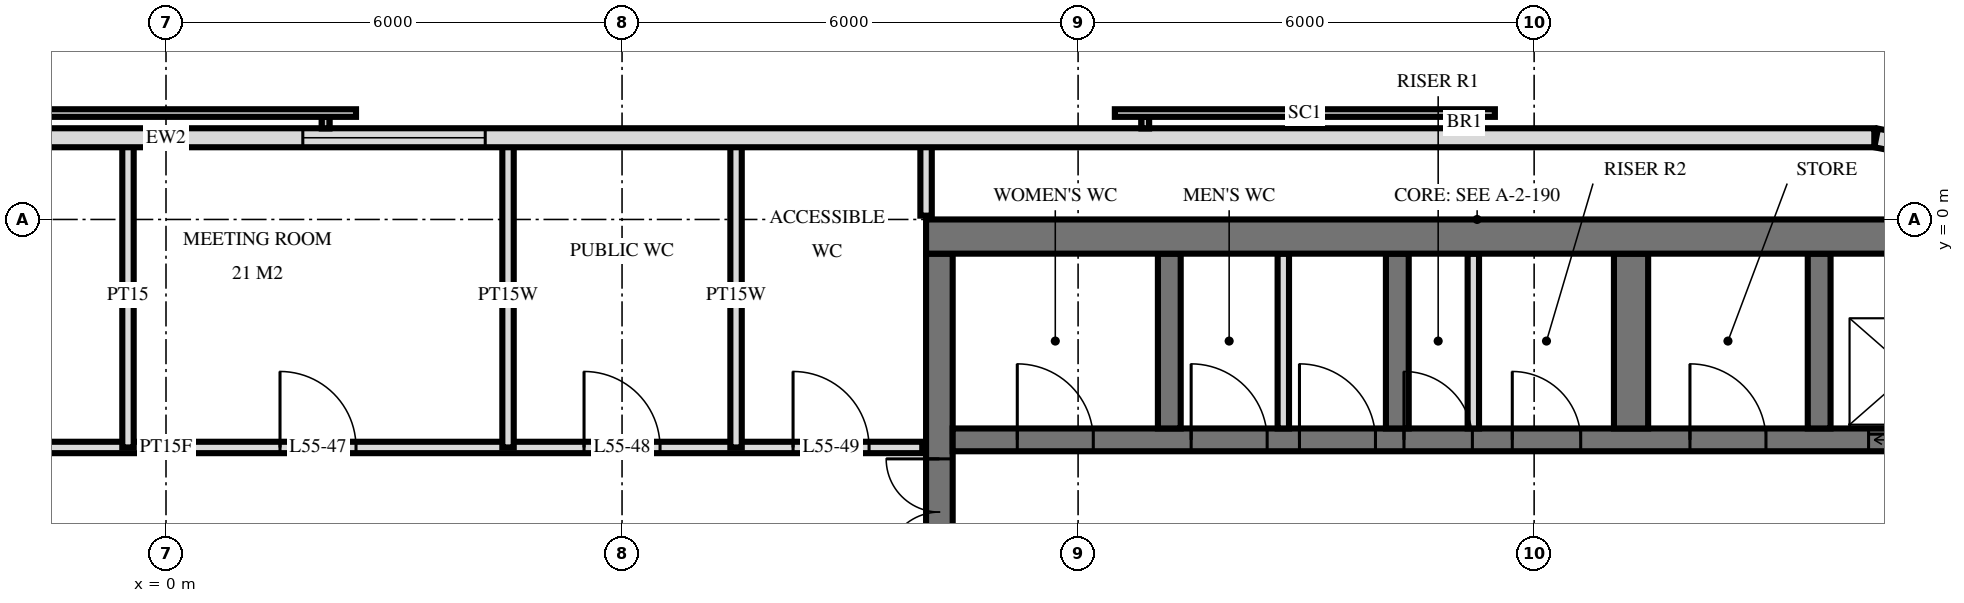
"""IFC4 building model, lengths in metres.
Left out: names, types, materials, properties, quantities, classifications, styles, units other than length and angle.
Written with IfcOpenShell. Run it as: python <this file> out.ifc"""

import sys

from ifc_helpers import new_model, si_unit, direction, frame, frame_2d, origin, place, context, subcontext, project, spatial, rectangle, extrude, element, fill, save


model = new_model("IFC4")
c1 = context("Model", 3, precision=1e-05, world=origin(), true_north=direction((0.0, 1.0)))
c2 = subcontext(c1, "Body", "Model", "MODEL_VIEW")
j1 = project(units=[si_unit("LENGTHUNIT", "METRE"), si_unit("PLANEANGLEUNIT", "RADIAN")], contexts=[c1])
p1 = place(None, origin())
s1 = spatial("IfcSite", under=j1, at=p1, CompositionType="ELEMENT")
p2 = place(p1, origin())
s2 = spatial("IfcBuilding", under=s1, at=p2, CompositionType="ELEMENT")
p3 = place(p2, frame((0.0, 0.0, 211.6)))
s3 = spatial("IfcBuildingStorey", under=s2, at=p3, CompositionType="ELEMENT", Elevation=211.6)
p4 = place(p3, frame((10.0, -0.225, 0.0), z_axis=(0.0, 0.0, 1.0), x_axis=(1.0, 0.0, 0.0)))
e1 = element("IfcWall", 1, at=p4, inside=s3, PredefinedType="SHEAR", context=c2, shape_type="SweptSolid", body=[
    extrude(rectangle(XDim=14.5, YDim=0.45, at=frame_2d((7.25, 0.0))), origin(), (0.0, 0.0, 1.0), 3.5),
])
p5 = place(p3, frame((10.175, -14.55, 0.0), z_axis=(0.0, 0.0, 1.0), x_axis=(0.0, 1.0, 0.0)))
e2 = element("IfcWall", 2, at=p5, inside=s3, PredefinedType="SHEAR", context=c2, shape_type="SweptSolid", body=[
    extrude(rectangle(XDim=14.1, YDim=0.35, at=frame_2d((7.05, 0.0))), origin(), (0.0, 0.0, 1.0), 3.5),
])
p6 = place(p5, frame((8.4, 0.0, 0.0)))
e3 = element("IfcOpeningElement", 3, at=p6, cuts=e2, PredefinedType="OPENING", context=c2, shape_type="SweptSolid", body=[
    extrude(rectangle(XDim=1.4, YDim=2.4, at=frame_2d((0.7, 1.2))), frame((0.0, 0.185, 0.0), z_axis=(0.0, -1.0, 0.0), x_axis=(1.0, 0.0, 0.0)), (0.0, 0.0, 1.0), 0.37),
])
p7 = place(p5, frame((10.0, 0.0, 0.0)))
e4 = element("IfcOpeningElement", 4, at=p7, cuts=e2, PredefinedType="OPENING", context=c2, shape_type="SweptSolid", body=[
    extrude(rectangle(XDim=1.4, YDim=2.4, at=frame_2d((0.7, 1.2))), frame((0.0, 0.185, 0.0), z_axis=(0.0, -1.0, 0.0), x_axis=(1.0, 0.0, 0.0)), (0.0, 0.0, 1.0), 0.37),
])
p8 = place(p5, frame((4.0, 0.0, 0.0)))
e5 = element("IfcOpeningElement", 5, at=p8, cuts=e2, PredefinedType="OPENING", context=c2, shape_type="SweptSolid", body=[
    extrude(rectangle(XDim=1.2, YDim=2.1, at=frame_2d((0.6, 1.05))), frame((0.0, 0.185, 0.0), z_axis=(0.0, -1.0, 0.0), x_axis=(1.0, 0.0, 0.0)), (0.0, 0.0, 1.0), 0.37),
])
p9 = place(p3, frame((10.35, -2.9, 0.0), z_axis=(0.0, 0.0, 1.0), x_axis=(1.0, 0.0, 0.0)))
e6 = element("IfcWall", 6, at=p9, inside=s3, PredefinedType="SHEAR", context=c2, shape_type="SweptSolid", body=[
    extrude(rectangle(XDim=13.7, YDim=0.3, at=frame_2d((6.85, 0.0))), origin(), (0.0, 0.0, 1.0), 3.5),
])
p10 = place(p9, frame((12.05, 0.0, 0.0)))
e7 = element("IfcOpeningElement", 7, at=p10, cuts=e6, PredefinedType="OPENING", context=c2, shape_type="SweptSolid", body=[
    extrude(rectangle(XDim=1.1, YDim=2.1, at=frame_2d((0.55, 1.05))), frame((0.0, 0.16, 0.0), z_axis=(0.0, -1.0, 0.0), x_axis=(1.0, 0.0, 0.0)), (0.0, 0.0, 1.0), 0.32),
])
p11 = place(p9, frame((5.938, 0.0, 0.0)))
e8 = element("IfcOpeningElement", 8, at=p11, cuts=e6, PredefinedType="OPENING", context=c2, shape_type="SweptSolid", body=[
    extrude(rectangle(XDim=0.9, YDim=2.1, at=frame_2d((0.45, 1.05))), frame((0.0, 0.16, 0.0), z_axis=(0.0, -1.0, 0.0), x_axis=(1.0, 0.0, 0.0)), (0.0, 0.0, 1.0), 0.32),
])
p12 = place(p9, frame((7.363, 0.0, 0.0)))
e9 = element("IfcOpeningElement", 9, at=p12, cuts=e6, PredefinedType="OPENING", context=c2, shape_type="SweptSolid", body=[
    extrude(rectangle(XDim=0.9, YDim=2.1, at=frame_2d((0.45, 1.05))), frame((0.0, 0.16, 0.0), z_axis=(0.0, -1.0, 0.0), x_axis=(1.0, 0.0, 0.0)), (0.0, 0.0, 1.0), 0.32),
])
p13 = place(p9, frame((0.85, 0.0, 0.0)))
e10 = element("IfcOpeningElement", 10, at=p13, cuts=e6, PredefinedType="OPENING", context=c2, shape_type="SweptSolid", body=[
    extrude(rectangle(XDim=1.0, YDim=2.1, at=frame_2d((0.5, 1.05))), frame((0.0, 0.16, 0.0), z_axis=(0.0, -1.0, 0.0), x_axis=(1.0, 0.0, 0.0)), (0.0, 0.0, 1.0), 0.32),
])
p14 = place(p9, frame((3.137, 0.0, 0.0)))
e11 = element("IfcOpeningElement", 11, at=p14, cuts=e6, PredefinedType="OPENING", context=c2, shape_type="SweptSolid", body=[
    extrude(rectangle(XDim=1.0, YDim=2.1, at=frame_2d((0.5, 1.05))), frame((0.0, 0.16, 0.0), z_axis=(0.0, -1.0, 0.0), x_axis=(1.0, 0.0, 0.0)), (0.0, 0.0, 1.0), 0.32),
])
p15 = place(p9, frame((4.562, 0.0, 0.0)))
e12 = element("IfcOpeningElement", 12, at=p15, cuts=e6, PredefinedType="OPENING", context=c2, shape_type="SweptSolid", body=[
    extrude(rectangle(XDim=1.0, YDim=2.1, at=frame_2d((0.5, 1.05))), frame((0.0, 0.16, 0.0), z_axis=(0.0, -1.0, 0.0), x_axis=(1.0, 0.0, 0.0)), (0.0, 0.0, 1.0), 0.32),
])
p16 = place(p9, frame((9.7, 0.0, 0.0)))
e13 = element("IfcOpeningElement", 13, at=p16, cuts=e6, PredefinedType="OPENING", context=c2, shape_type="SweptSolid", body=[
    extrude(rectangle(XDim=1.0, YDim=2.1, at=frame_2d((0.5, 1.05))), frame((0.0, 0.16, 0.0), z_axis=(0.0, -1.0, 0.0), x_axis=(1.0, 0.0, 0.0)), (0.0, 0.0, 1.0), 0.32),
])
for number, where, z_axis, x_axis in (
    (14, (13.2, -2.75, 0.0), (0.0, 0.0, 1.0), (0.0, 1.0, 0.0)),
    (15, (16.2, -2.75, 0.0), (0.0, 0.0, 1.0), (0.0, 1.0, 0.0)),
):
    element("IfcWall", number, at=place(p3, frame(where, z_axis=z_axis, x_axis=x_axis)), inside=s3, PredefinedType="SHEAR", context=c2, shape_type="SweptSolid", body=[
        extrude(rectangle(XDim=2.3, YDim=0.3, at=frame_2d((1.15, 0.0))), origin(), (0.0, 0.0, 1.0), 3.5),
    ])
p17 = place(p3, frame((19.275, -2.75, 0.0), z_axis=(0.0, 0.0, 1.0), x_axis=(0.0, 1.0, 0.0)))
e16 = element("IfcWall", 16, at=p17, inside=s3, PredefinedType="SHEAR", context=c2, shape_type="SweptSolid", body=[
    extrude(rectangle(XDim=2.3, YDim=0.45, at=frame_2d((1.15, 0.0))), origin(), (0.0, 0.0, 1.0), 3.5),
])
p18 = place(p3, frame((21.75, -2.75, 0.0), z_axis=(0.0, 0.0, 1.0), x_axis=(0.0, 1.0, 0.0)))
e17 = element("IfcWall", 17, at=p18, inside=s3, PredefinedType="SHEAR", context=c2, shape_type="SweptSolid", body=[
    extrude(rectangle(XDim=2.3, YDim=0.3, at=frame_2d((1.15, 0.0))), origin(), (0.0, 0.0, 1.0), 3.5),
])
p19 = place(p3, frame((24.149, 0.745, 0.0), z_axis=(0.0, 0.0, 1.0), x_axis=(-0.980803419081, 0.194999110559, 0.0)))
e18 = element("IfcWall", 18, at=p19, inside=s3, PredefinedType="SOLIDWALL", context=c2, shape_type="SweptSolid", body=[
    extrude(rectangle(XDim=1.681, YDim=0.25, at=frame_2d((0.841, 0.0))), origin(), (0.0, 0.0, 1.0), 3.22),
])
p20 = place(p3, frame((22.475, 1.075, 0.0), z_axis=(0.0, 0.0, 1.0), x_axis=(-1.0, 0.0, 0.0)))
e19 = element("IfcWall", 19, at=p20, inside=s3, PredefinedType="SOLIDWALL", context=c2, shape_type="SweptSolid", body=[
    extrude(rectangle(XDim=44.951, YDim=0.25, at=frame_2d((22.475, 0.0))), origin(), (0.0, 0.0, 1.0), 3.22),
])
p21 = place(p20, frame((18.275, 0.0, 0.9)))
e20 = element("IfcOpeningElement", 20, at=p21, cuts=e19, PredefinedType="OPENING", context=c2, shape_type="SweptSolid", body=[
    extrude(rectangle(XDim=2.4, YDim=1.5, at=frame_2d((1.2, 0.75))), frame((0.0, 0.135, 0.0), z_axis=(0.0, -1.0, 0.0), x_axis=(1.0, 0.0, 0.0)), (0.0, 0.0, 1.0), 0.27),
])
p22 = place(p20, frame((24.275, 0.0, 0.9)))
e21 = element("IfcOpeningElement", 21, at=p22, cuts=e19, PredefinedType="OPENING", context=c2, shape_type="SweptSolid", body=[
    extrude(rectangle(XDim=2.4, YDim=1.5, at=frame_2d((1.2, 0.75))), frame((0.0, 0.135, 0.0), z_axis=(0.0, -1.0, 0.0), x_axis=(1.0, 0.0, 0.0)), (0.0, 0.0, 1.0), 0.27),
])
p23 = place(p20, frame((27.275, 0.0, 0.9)))
e22 = element("IfcOpeningElement", 22, at=p23, cuts=e19, PredefinedType="OPENING", context=c2, shape_type="SweptSolid", body=[
    extrude(rectangle(XDim=2.4, YDim=1.5, at=frame_2d((1.2, 0.75))), frame((0.0, 0.135, 0.0), z_axis=(0.0, -1.0, 0.0), x_axis=(1.0, 0.0, 0.0)), (0.0, 0.0, 1.0), 0.27),
])
for number, where, z_axis, x_axis in (
    (23, (17.2, -2.75, 0.0), (0.0, 0.0, 1.0), (0.0, 1.0, 0.0)),
    (24, (14.7, -2.75, 0.0), (0.0, 0.0, 1.0), (0.0, 1.0, 0.0)),
):
    element("IfcWall", number, at=place(p3, frame(where, z_axis=z_axis, x_axis=x_axis)), inside=s3, PredefinedType="PARTITIONING", context=c2, shape_type="SweptSolid", body=[
        extrude(rectangle(XDim=2.3, YDim=0.15, at=frame_2d((1.15, 0.0))), origin(), (0.0, 0.0, 1.0), 3.2),
    ])
p24 = place(p3, frame((10.0, 0.05, 0.0), z_axis=(0.0, 0.0, 1.0), x_axis=(0.0, 1.0, 0.0)))
e25 = element("IfcWall", 25, at=p24, inside=s3, PredefinedType="PLUMBINGWALL", context=c2, shape_type="SweptSolid", body=[
    extrude(rectangle(XDim=0.97, YDim=0.15, at=frame_2d((0.485, 0.0))), origin(), (0.0, 0.0, 1.0), 3.22),
])
for number, where, z_axis, x_axis in (
    (26, (7.5, -3.0, 0.0), (0.0, 0.0, 1.0), (0.0, 1.0, 0.0)),
    (27, (4.5, -3.0, 0.0), (0.0, 0.0, 1.0), (0.0, 1.0, 0.0)),
):
    element("IfcWall", number, at=place(p3, frame(where, z_axis=z_axis, x_axis=x_axis)), inside=s3, PredefinedType="PLUMBINGWALL", context=c2, shape_type="SweptSolid", body=[
        extrude(rectangle(XDim=4.02, YDim=0.15, at=frame_2d((2.01, 0.0))), origin(), (0.0, 0.0, 1.0), 3.22),
    ])
p25 = place(p3, frame((-0.5, -3.0, 0.0), z_axis=(0.0, 0.0, 1.0), x_axis=(0.0, 1.0, 0.0)))
e28 = element("IfcWall", 28, at=p25, inside=s3, PredefinedType="PARTITIONING", context=c2, shape_type="SweptSolid", body=[
    extrude(rectangle(XDim=4.02, YDim=0.15, at=frame_2d((2.01, 0.0))), origin(), (0.0, 0.0, 1.0), 3.22),
])
p26 = place(p3, frame((-9.95, -3.0, 0.0), z_axis=(0.0, 0.0, 1.0), x_axis=(1.0, 0.0, 0.0)))
e29 = element("IfcWall", 29, at=p26, inside=s3, PredefinedType="PARTITIONING", context=c2, shape_type="SweptSolid", body=[
    extrude(rectangle(XDim=19.9, YDim=0.15, at=frame_2d((9.95, 0.0))), origin(), (0.0, 0.0, 1.0), 3.22),
])
p27 = place(p26, frame((4.2, 0.0, 0.0)))
e30 = element("IfcOpeningElement", 30, at=p27, cuts=e29, PredefinedType="OPENING", context=c2, shape_type="SweptSolid", body=[
    extrude(rectangle(XDim=1.0, YDim=2.1, at=frame_2d((0.5, 1.05))), frame((0.0, 0.085, 0.0), z_axis=(0.0, -1.0, 0.0), x_axis=(1.0, 0.0, 0.0)), (0.0, 0.0, 1.0), 0.17),
])
p28 = place(p26, frame((11.45, 0.0, 0.0)))
e31 = element("IfcOpeningElement", 31, at=p28, cuts=e29, PredefinedType="OPENING", context=c2, shape_type="SweptSolid", body=[
    extrude(rectangle(XDim=1.0, YDim=2.1, at=frame_2d((0.5, 1.05))), frame((0.0, 0.085, 0.0), z_axis=(0.0, -1.0, 0.0), x_axis=(1.0, 0.0, 0.0)), (0.0, 0.0, 1.0), 0.17),
])
p29 = place(p26, frame((15.45, 0.0, 0.0)))
e32 = element("IfcOpeningElement", 32, at=p29, cuts=e29, PredefinedType="OPENING", context=c2, shape_type="SweptSolid", body=[
    extrude(rectangle(XDim=1.0, YDim=2.1, at=frame_2d((0.5, 1.05))), frame((0.0, 0.085, 0.0), z_axis=(0.0, -1.0, 0.0), x_axis=(1.0, 0.0, 0.0)), (0.0, 0.0, 1.0), 0.17),
])
p30 = place(p26, frame((18.2, 0.0, 0.0)))
e33 = element("IfcOpeningElement", 33, at=p30, cuts=e29, PredefinedType="OPENING", context=c2, shape_type="SweptSolid", body=[
    extrude(rectangle(XDim=1.0, YDim=2.1, at=frame_2d((0.5, 1.05))), frame((0.0, 0.085, 0.0), z_axis=(0.0, -1.0, 0.0), x_axis=(1.0, 0.0, 0.0)), (0.0, 0.0, 1.0), 0.17),
])
p31 = place(p21, origin())
e34 = element("IfcWindow", 34, at=p31, inside=s3, PartitioningType="SINGLE_PANEL", PredefinedType="WINDOW", context=c2, shape_type="SweptSolid", body=[
    extrude(rectangle(XDim=2.4, YDim=1.5, at=frame_2d((1.2, 0.75))), frame((0.0, 0.03, 0.0), z_axis=(0.0, -1.0, 0.0), x_axis=(1.0, 0.0, 0.0)), (0.0, 0.0, 1.0), 0.06),
])
fill(e20, e34)
p32 = place(p10, origin())
e35 = element("IfcDoor", 35, at=p32, inside=s3, OperationType="DOUBLE_DOOR_SLIDING", PredefinedType="USERDEFINED", context=c2, shape_type="SweptSolid", body=[
    extrude(rectangle(XDim=1.1, YDim=2.1, at=frame_2d((0.55, 1.05))), frame((0.0, 0.025, 0.0), z_axis=(0.0, -1.0, 0.0), x_axis=(1.0, 0.0, 0.0)), (0.0, 0.0, 1.0), 0.05),
])
fill(e7, e35)
p33 = place(p7, origin())
e36 = element("IfcDoor", 36, at=p33, inside=s3, OperationType="DOUBLE_DOOR_SINGLE_SWING", PredefinedType="DOOR", context=c2, shape_type="SweptSolid", body=[
    extrude(rectangle(XDim=1.4, YDim=2.4, at=frame_2d((0.7, 1.2))), frame((0.0, 0.025, 0.0), z_axis=(0.0, -1.0, 0.0), x_axis=(1.0, 0.0, 0.0)), (0.0, 0.0, 1.0), 0.05),
])
fill(e4, e36)
p34 = place(p11, origin())
e37 = element("IfcDoor", 37, at=p34, inside=s3, OperationType="SINGLE_SWING_RIGHT", PredefinedType="DOOR", context=c2, shape_type="SweptSolid", body=[
    extrude(rectangle(XDim=0.9, YDim=2.1, at=frame_2d((0.45, 1.05))), frame((0.0, 0.025, 0.0), z_axis=(0.0, -1.0, 0.0), x_axis=(1.0, 0.0, 0.0)), (0.0, 0.0, 1.0), 0.05),
])
fill(e8, e37)
p35 = place(p12, origin())
e38 = element("IfcDoor", 38, at=p35, inside=s3, OperationType="SINGLE_SWING_RIGHT", PredefinedType="DOOR", context=c2, shape_type="SweptSolid", body=[
    extrude(rectangle(XDim=0.9, YDim=2.1, at=frame_2d((0.45, 1.05))), frame((0.0, 0.025, 0.0), z_axis=(0.0, -1.0, 0.0), x_axis=(1.0, 0.0, 0.0)), (0.0, 0.0, 1.0), 0.05),
])
fill(e9, e38)
p36 = place(p13, origin())
e39 = element("IfcDoor", 39, at=p36, inside=s3, OperationType="SINGLE_SWING_RIGHT", PredefinedType="DOOR", context=c2, shape_type="SweptSolid", body=[
    extrude(rectangle(XDim=1.0, YDim=2.1, at=frame_2d((0.5, 1.05))), frame((0.0, 0.025, 0.0), z_axis=(0.0, -1.0, 0.0), x_axis=(1.0, 0.0, 0.0)), (0.0, 0.0, 1.0), 0.05),
])
fill(e10, e39)
p37 = place(p14, origin())
e40 = element("IfcDoor", 40, at=p37, inside=s3, OperationType="SINGLE_SWING_RIGHT", PredefinedType="DOOR", context=c2, shape_type="SweptSolid", body=[
    extrude(rectangle(XDim=1.0, YDim=2.1, at=frame_2d((0.5, 1.05))), frame((0.0, 0.025, 0.0), z_axis=(0.0, -1.0, 0.0), x_axis=(1.0, 0.0, 0.0)), (0.0, 0.0, 1.0), 0.05),
])
fill(e11, e40)
p38 = place(p15, origin())
e41 = element("IfcDoor", 41, at=p38, inside=s3, OperationType="SINGLE_SWING_RIGHT", PredefinedType="DOOR", context=c2, shape_type="SweptSolid", body=[
    extrude(rectangle(XDim=1.0, YDim=2.1, at=frame_2d((0.5, 1.05))), frame((0.0, 0.025, 0.0), z_axis=(0.0, -1.0, 0.0), x_axis=(1.0, 0.0, 0.0)), (0.0, 0.0, 1.0), 0.05),
])
fill(e12, e41)
p39 = place(p16, origin())
e42 = element("IfcDoor", 42, at=p39, inside=s3, OperationType="SINGLE_SWING_RIGHT", PredefinedType="DOOR", context=c2, shape_type="SweptSolid", body=[
    extrude(rectangle(XDim=1.0, YDim=2.1, at=frame_2d((0.5, 1.05))), frame((0.0, 0.025, 0.0), z_axis=(0.0, -1.0, 0.0), x_axis=(1.0, 0.0, 0.0)), (0.0, 0.0, 1.0), 0.05),
])
fill(e13, e42)
p40 = place(p28, origin())
e43 = element("IfcDoor", 43, at=p40, inside=s3, OperationType="SINGLE_SWING_RIGHT", PredefinedType="DOOR", context=c2, shape_type="SweptSolid", body=[
    extrude(rectangle(XDim=1.0, YDim=2.1, at=frame_2d((0.5, 1.05))), frame((0.0, 0.025, 0.0), z_axis=(0.0, -1.0, 0.0), x_axis=(1.0, 0.0, 0.0)), (0.0, 0.0, 1.0), 0.05),
])
fill(e31, e43)
p41 = place(p29, origin())
e44 = element("IfcDoor", 44, at=p41, inside=s3, OperationType="SINGLE_SWING_RIGHT", PredefinedType="DOOR", context=c2, shape_type="SweptSolid", body=[
    extrude(rectangle(XDim=1.0, YDim=2.1, at=frame_2d((0.5, 1.05))), frame((0.0, 0.025, 0.0), z_axis=(0.0, -1.0, 0.0), x_axis=(1.0, 0.0, 0.0)), (0.0, 0.0, 1.0), 0.05),
])
fill(e32, e44)
p42 = place(p30, origin())
e45 = element("IfcDoor", 45, at=p42, inside=s3, OperationType="SINGLE_SWING_RIGHT", PredefinedType="DOOR", context=c2, shape_type="SweptSolid", body=[
    extrude(rectangle(XDim=1.0, YDim=2.1, at=frame_2d((0.5, 1.05))), frame((0.0, 0.025, 0.0), z_axis=(0.0, -1.0, 0.0), x_axis=(1.0, 0.0, 0.0)), (0.0, 0.0, 1.0), 0.05),
])
fill(e33, e45)
save(model, sys.argv[1])
